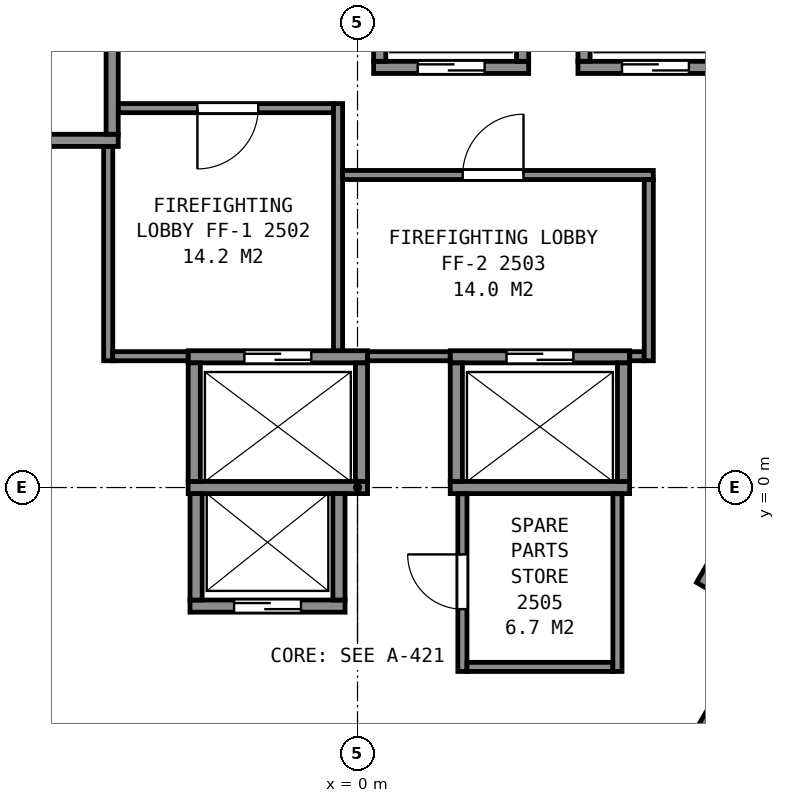
"""IFC4 building model, lengths in metres.
Left out: names, types, materials, properties, quantities, classifications, styles, units other than length and angle.
Written with IfcOpenShell. Run it as: python <this file> out.ifc"""

import sys

from ifc_helpers import new_model, si_unit, direction, frame, frame_2d, origin, place, context, subcontext, project, spatial, rectangle, extrude, element, fill, save


model = new_model("IFC4")
c1 = context("Model", 3, precision=1e-05, world=origin(), true_north=direction((0.0, 1.0)))
c2 = subcontext(c1, "Body", "Model", "MODEL_VIEW")
j1 = project(units=[si_unit("LENGTHUNIT", "METRE"), si_unit("PLANEANGLEUNIT", "RADIAN")], contexts=[c1])
p1 = place(None, origin())
s1 = spatial("IfcSite", under=j1, at=p1, CompositionType="ELEMENT")
p2 = place(p1, origin())
s2 = spatial("IfcBuilding", under=s1, at=p2, CompositionType="ELEMENT")
p3 = place(p2, frame((0.0, 0.0, 107.2)))
s3 = spatial("IfcBuildingStorey", under=s2, at=p3, CompositionType="ELEMENT", Elevation=107.2)
p4 = place(p3, frame((-2.755, -1.95, 0.0), z_axis=(0.0, 0.0, 1.0), x_axis=(1.0, 0.0, 0.0)))
e1 = element("IfcWall", 1, at=p4, inside=s3, PredefinedType="PARTITIONING", context=c2, shape_type="SweptSolid", body=[
    extrude(rectangle(XDim=2.55, YDim=0.2, at=frame_2d((1.275, 0.0))), origin(), (0.0, 0.0, 1.0), 3.6),
])
p5 = place(p4, frame((0.725, 0.0, 0.0)))
e2 = element("IfcOpeningElement", 2, at=p5, cuts=e1, PredefinedType="OPENING", context=c2, shape_type="SweptSolid", body=[
    extrude(rectangle(XDim=1.1, YDim=2.1, at=frame_2d((0.55, 1.05))), frame((0.0, 0.11, 0.0), z_axis=(0.0, -1.0, 0.0), x_axis=(1.0, 0.0, 0.0)), (0.0, 0.0, 1.0), 0.22),
])
p6 = place(p3, frame((-2.785, 0.0, 0.0), z_axis=(0.0, 0.0, 1.0), x_axis=(1.0, 0.0, 0.0)))
e3 = element("IfcWall", 3, at=p6, inside=s3, PredefinedType="PARTITIONING", context=c2, shape_type="SweptSolid", body=[
    extrude(rectangle(XDim=2.95, YDim=0.2, at=frame_2d((1.475, 0.0))), origin(), (0.0, 0.0, 1.0), 3.6),
])
p7 = place(p3, frame((1.525, 0.0, 0.0), z_axis=(0.0, 0.0, 1.0), x_axis=(1.0, 0.0, 0.0)))
e4 = element("IfcWall", 4, at=p7, inside=s3, PredefinedType="PARTITIONING", context=c2, shape_type="SweptSolid", body=[
    extrude(rectangle(XDim=2.95, YDim=0.2, at=frame_2d((1.475, 0.0))), origin(), (0.0, 0.0, 1.0), 3.6),
])
p8 = place(p3, frame((-2.785, 2.15, 0.0), z_axis=(0.0, 0.0, 1.0), x_axis=(1.0, 0.0, 0.0)))
e5 = element("IfcWall", 5, at=p8, inside=s3, PredefinedType="PARTITIONING", context=c2, shape_type="SweptSolid", body=[
    extrude(rectangle(XDim=2.95, YDim=0.2, at=frame_2d((1.475, 0.0))), origin(), (0.0, 0.0, 1.0), 3.6),
])
p9 = place(p8, frame((0.925, 0.0, 0.0)))
e6 = element("IfcOpeningElement", 6, at=p9, cuts=e5, PredefinedType="OPENING", context=c2, shape_type="SweptSolid", body=[
    extrude(rectangle(XDim=1.1, YDim=2.1, at=frame_2d((0.55, 1.05))), frame((0.0, 0.11, 0.0), z_axis=(0.0, -1.0, 0.0), x_axis=(1.0, 0.0, 0.0)), (0.0, 0.0, 1.0), 0.22),
])
p10 = place(p3, frame((1.525, 2.15, 0.0), z_axis=(0.0, 0.0, 1.0), x_axis=(1.0, 0.0, 0.0)))
e7 = element("IfcWall", 7, at=p10, inside=s3, PredefinedType="PARTITIONING", context=c2, shape_type="SweptSolid", body=[
    extrude(rectangle(XDim=2.95, YDim=0.2, at=frame_2d((1.475, 0.0))), origin(), (0.0, 0.0, 1.0), 3.6),
])
p11 = place(p10, frame((0.925, 0.0, 0.0)))
e8 = element("IfcOpeningElement", 8, at=p11, cuts=e7, PredefinedType="OPENING", context=c2, shape_type="SweptSolid", body=[
    extrude(rectangle(XDim=1.1, YDim=2.1, at=frame_2d((0.55, 1.05))), frame((0.0, 0.11, 0.0), z_axis=(0.0, -1.0, 0.0), x_axis=(1.0, 0.0, 0.0)), (0.0, 0.0, 1.0), 0.22),
])
p12 = place(p3, frame((-6.285, 5.71, 0.0), z_axis=(0.0, 0.0, 1.0), x_axis=(1.0, 0.0, 0.0)))
e9 = element("IfcWall", 9, at=p12, inside=s3, PredefinedType="PARTITIONING", context=c2, shape_type="SweptSolid", body=[
    extrude(rectangle(XDim=2.35, YDim=0.2, at=frame_2d((1.175, 0.0))), origin(), (0.0, 0.0, 1.0), 3.6),
])
p13 = place(p3, frame((0.265, 6.91, 0.0), z_axis=(0.0, 0.0, 1.0), x_axis=(1.0, 0.0, 0.0)))
e10 = element("IfcWall", 10, at=p13, inside=s3, PredefinedType="PARTITIONING", context=c2, shape_type="SweptSolid", body=[
    extrude(rectangle(XDim=2.55, YDim=0.2, at=frame_2d((1.275, 0.0))), origin(), (0.0, 0.0, 1.0), 3.6),
])
p14 = place(p13, frame((0.725, 0.0, 0.0)))
e11 = element("IfcOpeningElement", 11, at=p14, cuts=e10, PredefinedType="OPENING", context=c2, shape_type="SweptSolid", body=[
    extrude(rectangle(XDim=1.1, YDim=2.1, at=frame_2d((0.55, 1.05))), frame((0.0, 0.11, 0.0), z_axis=(0.0, -1.0, 0.0), x_axis=(1.0, 0.0, 0.0)), (0.0, 0.0, 1.0), 0.22),
])
p15 = place(p3, frame((3.625, 6.91, 0.0), z_axis=(0.0, 0.0, 1.0), x_axis=(1.0, 0.0, 0.0)))
e12 = element("IfcWall", 12, at=p15, inside=s3, PredefinedType="PARTITIONING", context=c2, shape_type="SweptSolid", body=[
    extrude(rectangle(XDim=2.55, YDim=0.2, at=frame_2d((1.275, 0.0))), origin(), (0.0, 0.0, 1.0), 3.6),
])
p16 = place(p15, frame((0.725, 0.0, 0.0)))
e13 = element("IfcOpeningElement", 13, at=p16, cuts=e12, PredefinedType="OPENING", context=c2, shape_type="SweptSolid", body=[
    extrude(rectangle(XDim=1.1, YDim=2.1, at=frame_2d((0.55, 1.05))), frame((0.0, 0.11, 0.0), z_axis=(0.0, -1.0, 0.0), x_axis=(1.0, 0.0, 0.0)), (0.0, 0.0, 1.0), 0.22),
])
p17 = place(p3, frame((5.527, -4.247, 0.0), z_axis=(0.0, 0.0, 1.0), x_axis=(0.499938297808, 0.866061024631, 0.0)))
e14 = element("IfcWall", 14, at=p17, inside=s3, PredefinedType="PARTITIONING", context=c2, shape_type="SweptSolid", body=[
    extrude(rectangle(XDim=2.35, YDim=0.2, at=frame_2d((1.175, 0.0))), origin(), (0.0, 0.0, 1.0), 3.6),
])
p18 = place(p17, frame((0.725, 0.0, 0.0)))
e15 = element("IfcOpeningElement", 15, at=p18, cuts=e14, PredefinedType="OPENING", context=c2, shape_type="SweptSolid", body=[
    extrude(rectangle(XDim=1.1, YDim=2.1, at=frame_2d((0.55, 1.05))), frame((0.0, 0.11, 0.0), z_axis=(0.0, -1.0, 0.0), x_axis=(1.0, 0.0, 0.0)), (0.0, 0.0, 1.0), 0.22),
])
p19 = place(p3, frame((5.663, -1.612, 0.0), z_axis=(0.0, 0.0, 1.0), x_axis=(0.49998122708, 0.866036242063, 0.0)))
e16 = element("IfcWall", 16, at=p19, inside=s3, PredefinedType="PARTITIONING", context=c2, shape_type="SweptSolid", body=[
    extrude(rectangle(XDim=4.9, YDim=0.2, at=frame_2d((2.45, 0.0))), origin(), (0.0, 0.0, 1.0), 3.6),
])
p20 = place(p3, frame((4.375, 0.1, 0.0), z_axis=(0.0, 0.0, 1.0), x_axis=(0.0, 1.0, 0.0)))
e17 = element("IfcWall", 17, at=p20, inside=s3, PredefinedType="PARTITIONING", context=c2, shape_type="SweptSolid", body=[
    extrude(rectangle(XDim=1.95, YDim=0.2, at=frame_2d((0.975, 0.0))), origin(), (0.0, 0.0, 1.0), 3.6),
])
for number, where, z_axis, x_axis in (
    (18, (3.725, 7.01, 0.0), (0.0, 0.0, 1.0), (0.0, 1.0, 0.0)),
    (19, (2.715, 7.01, 0.0), (0.0, 0.0, 1.0), (0.0, 1.0, 0.0)),
):
    element("IfcWall", number, at=place(p3, frame(where, z_axis=z_axis, x_axis=x_axis)), inside=s3, PredefinedType="PARTITIONING", context=c2, shape_type="SweptSolid", body=[
        extrude(rectangle(XDim=1.75, YDim=0.2, at=frame_2d((0.875, 0.0))), origin(), (0.0, 0.0, 1.0), 3.6),
    ])
p21 = place(p3, frame((1.625, 0.1, 0.0), z_axis=(0.0, 0.0, 1.0), x_axis=(0.0, 1.0, 0.0)))
e20 = element("IfcWall", 20, at=p21, inside=s3, PredefinedType="PARTITIONING", context=c2, shape_type="SweptSolid", body=[
    extrude(rectangle(XDim=1.95, YDim=0.2, at=frame_2d((0.975, 0.0))), origin(), (0.0, 0.0, 1.0), 3.6),
])
p22 = place(p3, frame((0.365, 7.01, 0.0), z_axis=(0.0, 0.0, 1.0), x_axis=(0.0, 1.0, 0.0)))
e21 = element("IfcWall", 21, at=p22, inside=s3, PredefinedType="PARTITIONING", context=c2, shape_type="SweptSolid", body=[
    extrude(rectangle(XDim=1.75, YDim=0.2, at=frame_2d((0.875, 0.0))), origin(), (0.0, 0.0, 1.0), 3.6),
])
p23 = place(p3, frame((0.065, 0.1, 0.0), z_axis=(0.0, 0.0, 1.0), x_axis=(0.0, 1.0, 0.0)))
e22 = element("IfcWall", 22, at=p23, inside=s3, PredefinedType="PARTITIONING", context=c2, shape_type="SweptSolid", body=[
    extrude(rectangle(XDim=1.95, YDim=0.2, at=frame_2d((0.975, 0.0))), origin(), (0.0, 0.0, 1.0), 3.6),
])
for number, where, z_axis, x_axis in (
    (23, (-0.305, -1.85, 0.0), (0.0, 0.0, 1.0), (0.0, 1.0, 0.0)),
    (24, (-2.655, -1.85, 0.0), (0.0, 0.0, 1.0), (0.0, 1.0, 0.0)),
):
    element("IfcWall", number, at=place(p3, frame(where, z_axis=z_axis, x_axis=x_axis)), inside=s3, PredefinedType="PARTITIONING", context=c2, shape_type="SweptSolid", body=[
        extrude(rectangle(XDim=1.75, YDim=0.2, at=frame_2d((0.875, 0.0))), origin(), (0.0, 0.0, 1.0), 3.6),
    ])
p24 = place(p3, frame((-2.685, 0.1, 0.0), z_axis=(0.0, 0.0, 1.0), x_axis=(0.0, 1.0, 0.0)))
e25 = element("IfcWall", 25, at=p24, inside=s3, PredefinedType="PARTITIONING", context=c2, shape_type="SweptSolid", body=[
    extrude(rectangle(XDim=1.95, YDim=0.2, at=frame_2d((0.975, 0.0))), origin(), (0.0, 0.0, 1.0), 3.6),
])
p25 = place(p3, frame((-4.035, 5.81, 0.0), z_axis=(0.0, 0.0, 1.0), x_axis=(0.0, 1.0, 0.0)))
e26 = element("IfcWall", 26, at=p25, inside=s3, PredefinedType="PARTITIONING", context=c2, shape_type="SweptSolid", body=[
    extrude(rectangle(XDim=1.75, YDim=0.2, at=frame_2d((0.875, 0.0))), origin(), (0.0, 0.0, 1.0), 3.6),
])
p26 = place(p3, frame((-13.664, 5.946, 0.0), z_axis=(0.0, 0.0, 1.0), x_axis=(0.499994327219, -0.866028678941, 0.0)))
e27 = element("IfcWall", 27, at=p26, inside=s3, PredefinedType="PARTITIONING", context=c2, shape_type="SweptSolid", body=[
    extrude(rectangle(XDim=23.968, YDim=0.2, at=frame_2d((11.984, 0.0))), origin(), (0.0, 0.0, 1.0), 3.35),
])
p27 = place(p3, frame((-4.152, -5.729, 0.0), z_axis=(0.0, 0.0, 1.0), x_axis=(-0.500024287448, 0.866011380966, 0.0)))
e28 = element("IfcWall", 28, at=p27, inside=s3, PredefinedType="PARTITIONING", context=c2, shape_type="SweptSolid", body=[
    extrude(rectangle(XDim=3.501, YDim=0.15, at=frame_2d((1.75, 0.0))), origin(), (0.0, 0.0, 1.0), 3.35),
])
p28 = place(p27, frame((2.026, 0.0, 0.0)))
e29 = element("IfcOpeningElement", 29, at=p28, cuts=e28, PredefinedType="OPENING", context=c2, shape_type="SweptSolid", body=[
    extrude(rectangle(XDim=0.9, YDim=2.1, at=frame_2d((0.45, 1.05))), frame((0.0, 0.085, 0.0), z_axis=(0.0, -1.0, 0.0), x_axis=(1.0, 0.0, 0.0)), (0.0, 0.0, 1.0), 0.17),
])
p29 = place(p27, frame((0.248, 0.0, 0.0)))
e30 = element("IfcOpeningElement", 30, at=p29, cuts=e28, PredefinedType="OPENING", context=c2, shape_type="SweptSolid", body=[
    extrude(rectangle(XDim=0.9, YDim=2.1, at=frame_2d((0.45, 1.05))), frame((0.0, 0.085, 0.0), z_axis=(0.0, -1.0, 0.0), x_axis=(1.0, 0.0, 0.0)), (0.0, 0.0, 1.0), 0.17),
])
p30 = place(p3, frame((-4.1, 2.085, 0.0), z_axis=(0.0, 0.0, 1.0), x_axis=(0.0, 1.0, 0.0)))
e31 = element("IfcWall", 31, at=p30, inside=s3, PredefinedType="PARTITIONING", context=c2, shape_type="SweptSolid", body=[
    extrude(rectangle(XDim=3.523, YDim=0.15, at=frame_2d((1.761, 0.0))), origin(), (0.0, 0.0, 1.0), 3.35),
])
p31 = place(p3, frame((-4.025, 2.16, 0.0), z_axis=(0.0, 0.0, 1.0), x_axis=(1.0, 0.0, 0.0)))
e32 = element("IfcWall", 32, at=p31, inside=s3, PredefinedType="PARTITIONING", context=c2, shape_type="SweptSolid", body=[
    extrude(rectangle(XDim=1.238, YDim=0.15, at=frame_2d((0.619, 0.0))), origin(), (0.0, 0.0, 1.0), 3.35),
])
p32 = place(p3, frame((-3.933, 6.24, 0.0), z_axis=(0.0, 0.0, 1.0), x_axis=(1.0, 0.0, 0.0)))
e33 = element("IfcWall", 33, at=p32, inside=s3, PredefinedType="PARTITIONING", context=c2, shape_type="SweptSolid", body=[
    extrude(rectangle(XDim=3.538, YDim=0.15, at=frame_2d((1.769, 0.0))), origin(), (0.0, 0.0, 1.0), 3.35),
])
p33 = place(p32, frame((1.3, 0.0, 0.0)))
e34 = element("IfcOpeningElement", 34, at=p33, cuts=e33, PredefinedType="OPENING", context=c2, shape_type="SweptSolid", body=[
    extrude(rectangle(XDim=1.0, YDim=2.1, at=frame_2d((0.5, 1.05))), frame((0.0, 0.085, 0.0), z_axis=(0.0, -1.0, 0.0), x_axis=(1.0, 0.0, 0.0)), (0.0, 0.0, 1.0), 0.17),
])
p34 = place(p3, frame((-0.32, 2.252, 0.0), z_axis=(0.0, 0.0, 1.0), x_axis=(0.0, 1.0, 0.0)))
e35 = element("IfcWall", 35, at=p34, inside=s3, PredefinedType="PARTITIONING", context=c2, shape_type="SweptSolid", body=[
    extrude(rectangle(XDim=4.063, YDim=0.15, at=frame_2d((2.031, 0.0))), origin(), (0.0, 0.0, 1.0), 3.35),
])
p35 = place(p3, frame((-0.245, 5.14, 0.0), z_axis=(0.0, 0.0, 1.0), x_axis=(1.0, 0.0, 0.0)))
e36 = element("IfcWall", 36, at=p35, inside=s3, PredefinedType="PARTITIONING", context=c2, shape_type="SweptSolid", body=[
    extrude(rectangle(XDim=5.11, YDim=0.15, at=frame_2d((2.555, 0.0))), origin(), (0.0, 0.0, 1.0), 3.35),
])
p36 = place(p35, frame((1.975, 0.0, 0.0)))
e37 = element("IfcOpeningElement", 37, at=p36, cuts=e36, PredefinedType="OPENING", context=c2, shape_type="SweptSolid", body=[
    extrude(rectangle(XDim=1.0, YDim=2.1, at=frame_2d((0.5, 1.05))), frame((0.0, 0.085, 0.0), z_axis=(0.0, -1.0, 0.0), x_axis=(1.0, 0.0, 0.0)), (0.0, 0.0, 1.0), 0.17),
])
p37 = place(p3, frame((0.167, 2.16, 0.0), z_axis=(0.0, 0.0, 1.0), x_axis=(1.0, 0.0, 0.0)))
e38 = element("IfcWall", 38, at=p37, inside=s3, PredefinedType="PARTITIONING", context=c2, shape_type="SweptSolid", body=[
    extrude(rectangle(XDim=1.356, YDim=0.15, at=frame_2d((0.678, 0.0))), origin(), (0.0, 0.0, 1.0), 3.35),
])
p38 = place(p3, frame((1.725, -0.102, 0.0), z_axis=(0.0, 0.0, 1.0), x_axis=(0.0, -1.0, 0.0)))
e39 = element("IfcWall", 39, at=p38, inside=s3, PredefinedType="PARTITIONING", context=c2, shape_type="SweptSolid", body=[
    extrude(rectangle(XDim=2.923, YDim=0.15, at=frame_2d((1.461, 0.0))), origin(), (0.0, 0.0, 1.0), 3.35),
])
p39 = place(p38, frame((0.998, 0.0, 0.0)))
e40 = element("IfcOpeningElement", 40, at=p39, cuts=e39, PredefinedType="OPENING", context=c2, shape_type="SweptSolid", body=[
    extrude(rectangle(XDim=0.9, YDim=2.1, at=frame_2d((0.45, 1.05))), frame((0.0, 0.085, 0.0), z_axis=(0.0, -1.0, 0.0), x_axis=(1.0, 0.0, 0.0)), (0.0, 0.0, 1.0), 0.17),
])
p40 = place(p3, frame((1.8, -2.95, 0.0), z_axis=(0.0, 0.0, 1.0), x_axis=(1.0, 0.0, 0.0)))
e41 = element("IfcWall", 41, at=p40, inside=s3, PredefinedType="PARTITIONING", context=c2, shape_type="SweptSolid", body=[
    extrude(rectangle(XDim=2.4, YDim=0.15, at=frame_2d((1.2, 0.0))), origin(), (0.0, 0.0, 1.0), 3.35),
])
p41 = place(p3, frame((4.275, -3.025, 0.0), z_axis=(0.0, 0.0, 1.0), x_axis=(0.0, 1.0, 0.0)))
e42 = element("IfcWall", 42, at=p41, inside=s3, PredefinedType="PARTITIONING", context=c2, shape_type="SweptSolid", body=[
    extrude(rectangle(XDim=2.923, YDim=0.15, at=frame_2d((1.461, 0.0))), origin(), (0.0, 0.0, 1.0), 3.35),
])
p42 = place(p3, frame((4.477, 2.16, 0.0), z_axis=(0.0, 0.0, 1.0), x_axis=(1.0, 0.0, 0.0)))
e43 = element("IfcWall", 43, at=p42, inside=s3, PredefinedType="PARTITIONING", context=c2, shape_type="SweptSolid", body=[
    extrude(rectangle(XDim=0.238, YDim=0.15, at=frame_2d((0.119, 0.0))), origin(), (0.0, 0.0, 1.0), 3.35),
])
p43 = place(p3, frame((4.79, 2.085, 0.0), z_axis=(0.0, 0.0, 1.0), x_axis=(0.0, 1.0, 0.0)))
e44 = element("IfcWall", 44, at=p43, inside=s3, PredefinedType="PARTITIONING", context=c2, shape_type="SweptSolid", body=[
    extrude(rectangle(XDim=2.98, YDim=0.15, at=frame_2d((1.49, 0.0))), origin(), (0.0, 0.0, 1.0), 3.35),
])
p44 = place(p3, frame((-3.756, -15.494, 0.0), z_axis=(0.0, 0.0, 1.0), x_axis=(-0.500027787016, 0.866009360349, 0.0)))
e45 = element("IfcWall", 45, at=p44, inside=s3, PredefinedType="PARTITIONING", context=c2, shape_type="SweptSolid", body=[
    extrude(rectangle(XDim=23.856, YDim=0.125, at=frame_2d((11.928, 0.0))), origin(), (0.0, 0.0, 1.0), 2.613),
])
p45 = place(p44, frame((15.368, 0.0, 0.0)))
e46 = element("IfcOpeningElement", 46, at=p45, cuts=e45, PredefinedType="OPENING", context=c2, shape_type="SweptSolid", body=[
    extrude(rectangle(XDim=1.0, YDim=2.1, at=frame_2d((0.5, 1.05))), frame((0.0, 0.073, 0.0), z_axis=(0.0, -1.0, 0.0), x_axis=(1.0, 0.0, 0.0)), (0.0, 0.0, 1.0), 0.145),
])
p46 = place(p44, frame((10.54, 0.0, 0.0)))
e47 = element("IfcOpeningElement", 47, at=p46, cuts=e45, PredefinedType="OPENING", context=c2, shape_type="SweptSolid", body=[
    extrude(rectangle(XDim=1.0, YDim=2.1, at=frame_2d((0.5, 1.05))), frame((0.0, 0.073, 0.0), z_axis=(0.0, -1.0, 0.0), x_axis=(1.0, 0.0, 0.0)), (0.0, 0.0, 1.0), 0.145),
])
p47 = place(p3, frame((15.684, 5.165, 0.0), z_axis=(0.0, 0.0, 1.0), x_axis=(-0.500027787016, -0.866009360349, 0.0)))
e48 = element("IfcWall", 48, at=p47, inside=s3, PredefinedType="PARTITIONING", context=c2, shape_type="SweptSolid", body=[
    extrude(rectangle(XDim=23.856, YDim=0.125, at=frame_2d((11.928, 0.0))), origin(), (0.0, 0.0, 1.0), 2.613),
])
p48 = place(p47, frame((16.996, 0.0, 0.0)))
e49 = element("IfcOpeningElement", 49, at=p48, cuts=e48, PredefinedType="OPENING", context=c2, shape_type="SweptSolid", body=[
    extrude(rectangle(XDim=1.0, YDim=2.1, at=frame_2d((0.5, 1.05))), frame((0.0, 0.073, 0.0), z_axis=(0.0, -1.0, 0.0), x_axis=(1.0, 0.0, 0.0)), (0.0, 0.0, 1.0), 0.145),
])
p49 = place(p47, frame((12.28, 0.0, 0.0)))
e50 = element("IfcOpeningElement", 50, at=p49, cuts=e48, PredefinedType="OPENING", context=c2, shape_type="SweptSolid", body=[
    extrude(rectangle(XDim=1.0, YDim=2.1, at=frame_2d((0.5, 1.05))), frame((0.0, 0.073, 0.0), z_axis=(0.0, -1.0, 0.0), x_axis=(1.0, 0.0, 0.0)), (0.0, 0.0, 1.0), 0.145),
])
p50 = place(p14, origin())
e51 = element("IfcDoor", 51, at=p50, inside=s3, OperationType="SLIDING_TO_LEFT", PredefinedType="DOOR", context=c2, shape_type="SweptSolid", body=[
    extrude(rectangle(XDim=1.1, YDim=2.1, at=frame_2d((0.55, 1.05))), frame((0.0, 0.025, 0.0), z_axis=(0.0, -1.0, 0.0), x_axis=(1.0, 0.0, 0.0)), (0.0, 0.0, 1.0), 0.05),
])
fill(e11, e51)
p51 = place(p5, origin())
e52 = element("IfcDoor", 52, at=p51, inside=s3, OperationType="SLIDING_TO_RIGHT", PredefinedType="DOOR", context=c2, shape_type="SweptSolid", body=[
    extrude(rectangle(XDim=1.1, YDim=2.1, at=frame_2d((0.55, 1.05))), frame((0.0, 0.025, 0.0), z_axis=(0.0, -1.0, 0.0), x_axis=(1.0, 0.0, 0.0)), (0.0, 0.0, 1.0), 0.05),
])
fill(e2, e52)
p52 = place(p16, origin())
e53 = element("IfcDoor", 53, at=p52, inside=s3, OperationType="SLIDING_TO_LEFT", PredefinedType="DOOR", context=c2, shape_type="SweptSolid", body=[
    extrude(rectangle(XDim=1.1, YDim=2.1, at=frame_2d((0.55, 1.05))), frame((0.0, 0.025, 0.0), z_axis=(0.0, -1.0, 0.0), x_axis=(1.0, 0.0, 0.0)), (0.0, 0.0, 1.0), 0.05),
])
fill(e13, e53)
p53 = place(p9, origin())
e54 = element("IfcDoor", 54, at=p53, inside=s3, OperationType="SLIDING_TO_LEFT", PredefinedType="DOOR", context=c2, shape_type="SweptSolid", body=[
    extrude(rectangle(XDim=1.1, YDim=2.1, at=frame_2d((0.55, 1.05))), frame((0.0, 0.025, 0.0), z_axis=(0.0, -1.0, 0.0), x_axis=(1.0, 0.0, 0.0)), (0.0, 0.0, 1.0), 0.05),
])
fill(e6, e54)
p54 = place(p11, origin())
e55 = element("IfcDoor", 55, at=p54, inside=s3, OperationType="SLIDING_TO_RIGHT", PredefinedType="DOOR", context=c2, shape_type="SweptSolid", body=[
    extrude(rectangle(XDim=1.1, YDim=2.1, at=frame_2d((0.55, 1.05))), frame((0.0, 0.025, 0.0), z_axis=(0.0, -1.0, 0.0), x_axis=(1.0, 0.0, 0.0)), (0.0, 0.0, 1.0), 0.05),
])
fill(e8, e55)
p55 = place(p33, origin())
e56 = element("IfcDoor", 56, at=p55, inside=s3, OperationType="SINGLE_SWING_LEFT", PredefinedType="DOOR", context=c2, shape_type="SweptSolid", body=[
    extrude(rectangle(XDim=1.0, YDim=2.1, at=frame_2d((0.5, 1.05))), frame((0.0, 0.025, 0.0), z_axis=(0.0, -1.0, 0.0), x_axis=(1.0, 0.0, 0.0)), (0.0, 0.0, 1.0), 0.05),
])
fill(e34, e56)
p56 = place(p36, origin())
e57 = element("IfcDoor", 57, at=p56, inside=s3, OperationType="SINGLE_SWING_RIGHT", PredefinedType="DOOR", context=c2, shape_type="SweptSolid", body=[
    extrude(rectangle(XDim=1.0, YDim=2.1, at=frame_2d((0.5, 1.05))), frame((0.0, 0.025, 0.0), z_axis=(0.0, -1.0, 0.0), x_axis=(1.0, 0.0, 0.0)), (0.0, 0.0, 1.0), 0.05),
])
fill(e37, e57)
p57 = place(p39, origin())
e58 = element("IfcDoor", 58, at=p57, inside=s3, OperationType="SINGLE_SWING_LEFT", PredefinedType="DOOR", context=c2, shape_type="SweptSolid", body=[
    extrude(rectangle(XDim=0.9, YDim=2.1, at=frame_2d((0.45, 1.05))), frame((0.0, 0.025, 0.0), z_axis=(0.0, -1.0, 0.0), x_axis=(1.0, 0.0, 0.0)), (0.0, 0.0, 1.0), 0.05),
])
fill(e40, e58)
save(model, sys.argv[1])
